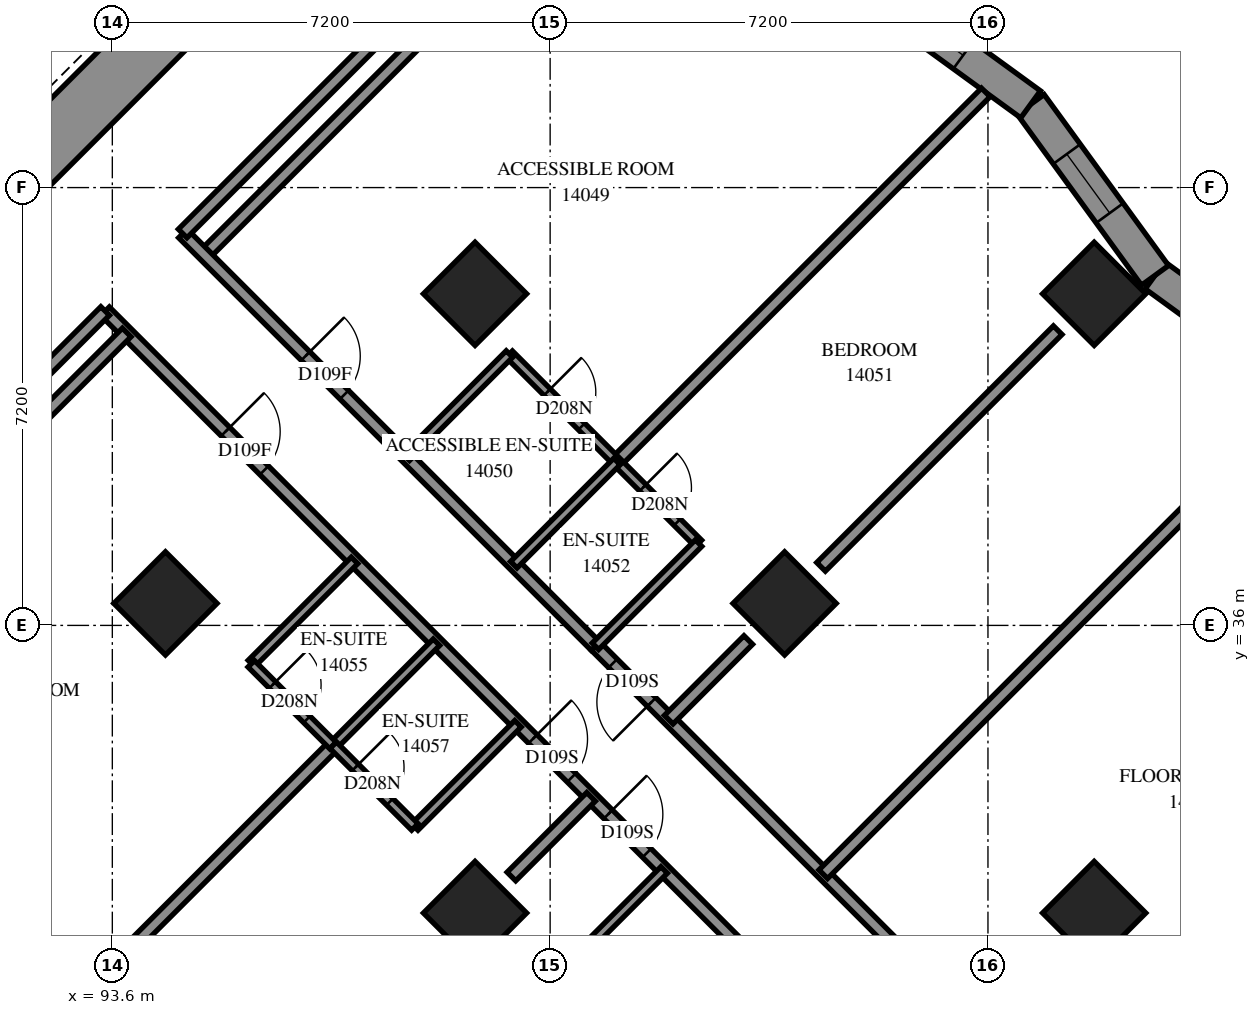
"""IFC4 building model, lengths in metres.
Left out: names, types, materials, properties, quantities, classifications, styles, units other than length and angle.
Written with IfcOpenShell. Run it as: python <this file> out.ifc"""

import sys

from ifc_helpers import new_model, si_unit, direction, frame, frame_2d, origin, origin_2d, place, context, subcontext, project, spatial, polyline, rectangle, outline, extrude, element, fill, save


model = new_model("IFC4")
c1 = context("Model", 3, precision=1e-05, world=origin(), true_north=direction((0.0, 1.0)))
c2 = subcontext(c1, "Body", "Model", "MODEL_VIEW")
j1 = project(units=[si_unit("LENGTHUNIT", "METRE"), si_unit("PLANEANGLEUNIT", "RADIAN")], contexts=[c1])
p1 = place(None, origin())
s1 = spatial("IfcSite", under=j1, at=p1, CompositionType="ELEMENT")
p2 = place(p1, origin())
s2 = spatial("IfcBuilding", under=s1, at=p2, CompositionType="ELEMENT")
p3 = place(p2, frame((0.0, 0.0, 54.2)))
s3 = spatial("IfcBuildingStorey", under=s2, at=p3, CompositionType="ELEMENT", Elevation=54.2)
for number, where, z_axis, x_axis in (
    (1, (99.565, 41.453, 0.0), (0.0, 0.0, 1.0), (0.707, -0.707, 0.0)),
    (2, (94.474, 36.362, 0.0), (0.0, 0.0, 1.0), (0.707, -0.707, 0.0)),
    (3, (109.747, 41.453, 0.0), (0.0, 0.0, 1.0), (0.707, -0.707, 0.0)),
    (4, (104.656, 36.362, 0.0), (0.0, 0.0, 1.0), (0.707, -0.707, 0.0)),
    (5, (99.565, 31.271, 0.0), (0.0, 0.0, 1.0), (0.707, -0.707, 0.0)),
    (6, (109.747, 31.271, 0.0), (0.0, 0.0, 1.0), (0.707, -0.707, 0.0)),
):
    element("IfcColumn", number, at=place(p3, frame(where, z_axis=z_axis, x_axis=x_axis)), inside=s3, PredefinedType="COLUMN", context=c2, shape_type="SweptSolid", body=[
        extrude(rectangle(XDim=1.2, YDim=1.2, at=origin_2d()), origin(), (0.0, 0.0, 1.0), 3.1),
    ])
p4 = place(p3, frame((87.19, 38.554, -0.3), z_axis=(0.0, 0.0, 1.0), x_axis=(0.707103309, 0.7071102534, 0.0)))
e7 = element("IfcWall", 7, at=p4, inside=s3, PredefinedType="SHEAR", context=c2, shape_type="SweptSolid", body=[
    extrude(rectangle(XDim=14.4, YDim=1.0, at=frame_2d((7.2, 0.0))), origin(), (0.0, 0.0, 1.0), 2.7),
])
p5 = place(p4, frame((4.55, 0.0, 0.3)))
e8 = element("IfcOpeningElement", 8, at=p5, cuts=e7, PredefinedType="OPENING", context=c2, shape_type="SweptSolid", body=[
    extrude(rectangle(XDim=1.1, YDim=2.1, at=frame_2d((0.55, 1.05))), frame((0.0, 0.51, 0.0), z_axis=(0.0, -1.0, 0.0), x_axis=(1.0, 0.0, 0.0)), (0.0, 0.0, 1.0), 1.02),
])
p6 = place(p4, frame((11.35, 0.0, 0.3)))
e9 = element("IfcOpeningElement", 9, at=p6, cuts=e7, PredefinedType="OPENING", context=c2, shape_type="SweptSolid", body=[
    extrude(rectangle(XDim=1.1, YDim=2.1, at=frame_2d((0.55, 1.05))), frame((0.0, 0.51, 0.0), z_axis=(0.0, -1.0, 0.0), x_axis=(1.0, 0.0, 0.0)), (0.0, 0.0, 1.0), 1.02),
])
p7 = place(p3, frame((113.56, 39.71, 0.0), z_axis=(0.0, 0.0, 1.0), x_axis=(-0.8086577494, 0.5882793931, 0.0)))
e10 = element("IfcWall", 10, at=p7, inside=s3, PredefinedType="SOLIDWALL", context=c2, shape_type="SweptSolid", body=[
    extrude(outline(polyline([(-0.043, -0.275), (3.435, -0.275), (3.522, 0.275), (0.043, 0.275), (-0.043, -0.275)])), origin(), (0.0, 0.0, 1.0), 3.1),
])
p8 = place(p7, frame((1.161, 0.0, 0.5)))
e11 = element("IfcOpeningElement", 11, at=p8, cuts=e10, PredefinedType="OPENING", context=c2, shape_type="SweptSolid", body=[
    extrude(rectangle(XDim=1.2, YDim=2.45, at=frame_2d((0.6, 1.225))), frame((0.0, 0.285, 0.0), z_axis=(0.0, -1.0, 0.0), x_axis=(1.0, 0.0, 0.0)), (0.0, 0.0, 1.0), 0.57),
])
p9 = place(p3, frame((110.747, 41.756, 0.0), z_axis=(0.0, 0.0, 1.0), x_axis=(-0.5882793931, 0.8086577494, 0.0)))
e12 = element("IfcWall", 12, at=p9, inside=s3, PredefinedType="SOLIDWALL", context=c2, shape_type="SweptSolid", body=[
    extrude(outline(polyline([(0.043, -0.275), (3.522, -0.275), (3.435, 0.275), (-0.043, 0.275), (0.043, -0.275)])), origin(), (0.0, 0.0, 1.0), 3.1),
])
p10 = place(p9, frame((1.267, 0.0, 0.5)))
e13 = element("IfcOpeningElement", 13, at=p10, cuts=e12, PredefinedType="OPENING", context=c2, shape_type="SweptSolid", body=[
    extrude(rectangle(XDim=1.2, YDim=2.45, at=frame_2d((0.6, 1.225))), frame((0.0, 0.285, 0.0), z_axis=(0.0, -1.0, 0.0), x_axis=(1.0, 0.0, 0.0)), (0.0, 0.0, 1.0), 0.57),
])
p11 = place(p3, frame((108.701, 44.569, 0.0), z_axis=(0.0, 0.0, 1.0), x_axis=(-0.8086577494, 0.5882793931, 0.0)))
e14 = element("IfcWall", 14, at=p11, inside=s3, PredefinedType="SOLIDWALL", context=c2, shape_type="SweptSolid", body=[
    extrude(outline(polyline([(-0.043, -0.275), (3.435, -0.275), (3.522, 0.275), (0.043, 0.275), (-0.043, -0.275)])), origin(), (0.0, 0.0, 1.0), 3.1),
])
p12 = place(p11, frame((1.372, 0.0, 0.5)))
e15 = element("IfcOpeningElement", 15, at=p12, cuts=e14, PredefinedType="OPENING", context=c2, shape_type="SweptSolid", body=[
    extrude(rectangle(XDim=1.2, YDim=2.45, at=frame_2d((0.6, 1.225))), frame((0.0, 0.285, 0.0), z_axis=(0.0, -1.0, 0.0), x_axis=(1.0, 0.0, 0.0)), (0.0, 0.0, 1.0), 0.57),
])
p13 = place(p3, frame((93.481, 41.167, 0.0), z_axis=(0.0, 0.0, 1.0), x_axis=(0.7071067812, -0.7071067812, 0.0)))
e16 = element("IfcWall", 16, at=p13, inside=s3, PredefinedType="PARTITIONING", context=c2, shape_type="SweptSolid", body=[
    extrude(rectangle(XDim=25.699, YDim=0.2, at=frame_2d((12.85, 0.0))), origin(), (0.0, 0.0, 1.0), 3.1),
])
p14 = place(p13, frame((2.8, 0.0, 0.0)))
e17 = element("IfcOpeningElement", 17, at=p14, cuts=e16, PredefinedType="OPENING", context=c2, shape_type="SweptSolid", body=[
    extrude(rectangle(XDim=0.9, YDim=2.1, at=frame_2d((0.45, 1.05))), frame((0.0, 0.11, 0.0), z_axis=(0.0, -1.0, 0.0), x_axis=(1.0, 0.0, 0.0)), (0.0, 0.0, 1.0), 0.22),
])
p15 = place(p13, frame((9.948, 0.0, 0.0)))
e18 = element("IfcOpeningElement", 18, at=p15, cuts=e16, PredefinedType="OPENING", context=c2, shape_type="SweptSolid", body=[
    extrude(rectangle(XDim=0.9, YDim=2.1, at=frame_2d((0.45, 1.05))), frame((0.0, 0.11, 0.0), z_axis=(0.0, -1.0, 0.0), x_axis=(1.0, 0.0, 0.0)), (0.0, 0.0, 1.0), 0.22),
])
p16 = place(p13, frame((11.7, 0.0, 0.0)))
e19 = element("IfcOpeningElement", 19, at=p16, cuts=e16, PredefinedType="OPENING", context=c2, shape_type="SweptSolid", body=[
    extrude(rectangle(XDim=0.9, YDim=2.1, at=frame_2d((0.45, 1.05))), frame((0.0, 0.11, 0.0), z_axis=(0.0, -1.0, 0.0), x_axis=(1.0, 0.0, 0.0)), (0.0, 0.0, 1.0), 0.22),
])
p17 = place(p13, frame((17.25, 0.0, 0.0)))
e20 = element("IfcOpeningElement", 20, at=p17, cuts=e16, PredefinedType="OPENING", context=c2, shape_type="SweptSolid", body=[
    extrude(rectangle(XDim=0.9, YDim=2.1, at=frame_2d((0.45, 1.05))), frame((0.0, 0.11, 0.0), z_axis=(0.0, -1.0, 0.0), x_axis=(1.0, 0.0, 0.0)), (0.0, 0.0, 1.0), 0.22),
])
p18 = place(p13, frame((22.82, 0.0, 0.0)))
e21 = element("IfcOpeningElement", 21, at=p18, cuts=e16, PredefinedType="OPENING", context=c2, shape_type="SweptSolid", body=[
    extrude(rectangle(XDim=0.9, YDim=2.1, at=frame_2d((0.45, 1.05))), frame((0.0, 0.11, 0.0), z_axis=(0.0, -1.0, 0.0), x_axis=(1.0, 0.0, 0.0)), (0.0, 0.0, 1.0), 0.22),
])
p19 = place(p3, frame((111.352, 25.855, 0.0), z_axis=(0.0, 0.0, 1.0), x_axis=(-0.7070418597, 0.7071716967, 0.0)))
e22 = element("IfcWall", 22, at=p19, inside=s3, PredefinedType="PARTITIONING", context=c2, shape_type="SweptSolid", body=[
    extrude(rectangle(XDim=13.864, YDim=0.2, at=frame_2d((6.932, 0.0))), origin(), (0.0, 0.0, 1.0), 3.1),
])
p20 = place(p19, frame((12.564, 0.0, 0.0)))
e23 = element("IfcOpeningElement", 23, at=p20, cuts=e22, PredefinedType="OPENING", context=c2, shape_type="SweptSolid", body=[
    extrude(rectangle(XDim=0.9, YDim=2.1, at=frame_2d((0.45, 1.05))), frame((0.0, 0.11, 0.0), z_axis=(0.0, -1.0, 0.0), x_axis=(1.0, 0.0, 0.0)), (0.0, 0.0, 1.0), 0.22),
])
p21 = place(p19, frame((5.19, 0.0, 0.0)))
e24 = element("IfcOpeningElement", 24, at=p21, cuts=e22, PredefinedType="OPENING", context=c2, shape_type="SweptSolid", body=[
    extrude(rectangle(XDim=1.0, YDim=2.1, at=frame_2d((0.5, 1.05))), frame((0.0, 0.11, 0.0), z_axis=(0.0, -1.0, 0.0), x_axis=(1.0, 0.0, 0.0)), (0.0, 0.0, 1.0), 0.22),
])
p22 = place(p3, frame((105.292, 31.908, 0.0), z_axis=(0.0, 0.0, 1.0), x_axis=(0.7071067812, 0.7071067812, 0.0)))
e25 = element("IfcWall", 25, at=p22, inside=s3, PredefinedType="PARTITIONING", context=c2, shape_type="SweptSolid", body=[
    extrude(rectangle(XDim=11.033, YDim=0.2, at=frame_2d((5.516, 0.0))), origin(), (0.0, 0.0, 1.0), 3.1),
])
p23 = place(p3, frame((95.109, 42.091, 0.0), z_axis=(0.0, 0.0, 1.0), x_axis=(0.7071113562, 0.7071022062, 0.0)))
e26 = element("IfcWall", 26, at=p23, inside=s3, PredefinedType="PARTITIONING", context=c2, shape_type="SweptSolid", body=[
    extrude(rectangle(XDim=10.929, YDim=0.2, at=frame_2d((5.465, 0.0))), origin(), (0.0, 0.0, 1.0), 3.1),
])
p24 = place(p3, frame((86.312, 33.293, 0.0), z_axis=(0.0, 0.0, 1.0), x_axis=(0.7071067812, 0.7071067812, 0.0)))
e27 = element("IfcWall", 27, at=p24, inside=s3, PredefinedType="PARTITIONING", context=c2, shape_type="SweptSolid", body=[
    extrude(rectangle(XDim=10.641, YDim=0.2, at=frame_2d((5.321, 0.0))), origin(), (0.0, 0.0, 1.0), 3.1),
])
p25 = place(p3, frame((94.761, 42.446, 0.0), z_axis=(0.0, 0.0, 1.0), x_axis=(0.7071067812, -0.7071067812, 0.0)))
e28 = element("IfcWall", 28, at=p25, inside=s3, PredefinedType="PARTITIONING", context=c2, shape_type="SweptSolid", body=[
    extrude(rectangle(XDim=9.597, YDim=0.2, at=frame_2d((4.798, 0.0))), origin(), (0.0, 0.0, 1.0), 3.1),
])
p26 = place(p25, frame((2.851, 0.0, 0.0)))
e29 = element("IfcOpeningElement", 29, at=p26, cuts=e28, PredefinedType="OPENING", context=c2, shape_type="SweptSolid", body=[
    extrude(rectangle(XDim=0.9, YDim=2.1, at=frame_2d((0.45, 1.05))), frame((0.0, 0.11, 0.0), z_axis=(0.0, -1.0, 0.0), x_axis=(1.0, 0.0, 0.0)), (0.0, 0.0, 1.0), 0.22),
])
for number, where, z_axis, x_axis in (
    (30, (86.836, 34.524, 0.0), (0.0, 0.0, 1.0), (0.707, 0.707, 0.0)),
    (31, (94.757, 42.445, 0.0), (0.0, 0.0, 1.0), (0.707, 0.707, 0.0)),
):
    element("IfcWall", number, at=place(p3, frame(where, z_axis=z_axis, x_axis=x_axis)), inside=s3, PredefinedType="PARTITIONING", context=c2, shape_type="SweptSolid", body=[
        extrude(rectangle(XDim=9.399, YDim=0.2, at=frame_2d((4.699, 0.0))), origin(), (0.0, 0.0, 1.0), 3.1),
    ])
p27 = place(p3, frame((101.896, 38.698, 0.0), z_axis=(0.0, 0.0, 1.0), x_axis=(0.7072233116, 0.7069902315, 0.0)))
e32 = element("IfcWall", 32, at=p27, inside=s3, PredefinedType="PARTITIONING", context=c2, shape_type="SweptSolid", body=[
    extrude(rectangle(XDim=8.581, YDim=0.2, at=frame_2d((4.29, 0.0))), origin(), (0.0, 0.0, 1.0), 3.1),
])
p28 = place(p3, frame((91.459, 28.251, 0.0), z_axis=(0.0, 0.0, 1.0), x_axis=(0.7072292218, 0.7069843194, 0.0)))
e33 = element("IfcWall", 33, at=p28, inside=s3, PredefinedType="PARTITIONING", context=c2, shape_type="SweptSolid", body=[
    extrude(rectangle(XDim=8.166, YDim=0.2, at=frame_2d((4.083, 0.0))), origin(), (0.0, 0.0, 1.0), 3.1),
])
p29 = place(p3, frame((105.255, 36.963, 0.0), z_axis=(0.0, 0.0, 1.0), x_axis=(0.7071067812, 0.7071067812, 0.0)))
e34 = element("IfcWall", 34, at=p29, inside=s3, PredefinedType="PARTITIONING", context=c2, shape_type="SweptSolid", body=[
    extrude(rectangle(XDim=5.504, YDim=0.2, at=frame_2d((2.752, 0.0))), origin(), (0.0, 0.0, 1.0), 3.1),
])
p30 = place(p3, frame((100.126, 40.461, 0.0), z_axis=(0.0, 0.0, 1.0), x_axis=(0.7071067812, -0.7071067812, 0.0)))
e35 = element("IfcWall", 35, at=p30, inside=s3, PredefinedType="PARTITIONING", context=c2, shape_type="SweptSolid", body=[
    extrude(rectangle(XDim=4.401, YDim=0.15, at=frame_2d((2.2, 0.0))), origin(), (0.0, 0.0, 1.0), 3.1),
])
p31 = place(p30, frame((0.883, 0.0, 0.0)))
e36 = element("IfcOpeningElement", 36, at=p31, cuts=e35, PredefinedType="OPENING", context=c2, shape_type="SweptSolid", body=[
    extrude(rectangle(XDim=0.8, YDim=2.1, at=frame_2d((0.4, 1.05))), frame((0.0, 0.085, 0.0), z_axis=(0.0, -1.0, 0.0), x_axis=(1.0, 0.0, 0.0)), (0.0, 0.0, 1.0), 0.17),
])
p32 = place(p30, frame((3.108, 0.0, 0.0)))
e37 = element("IfcOpeningElement", 37, at=p32, cuts=e35, PredefinedType="OPENING", context=c2, shape_type="SweptSolid", body=[
    extrude(rectangle(XDim=0.8, YDim=2.1, at=frame_2d((0.4, 1.05))), frame((0.0, 0.085, 0.0), z_axis=(0.0, -1.0, 0.0), x_axis=(1.0, 0.0, 0.0)), (0.0, 0.0, 1.0), 0.17),
])
for number, where, z_axis, x_axis in (
    (38, (100.977, 30.281, 0.0), (0.0, 0.0, 1.0), (0.707, 0.707, 0.0)),
    (39, (98.573, 32.685, 0.0), (0.0, 0.0, 1.0), (0.707, 0.707, 0.0)),
):
    element("IfcWall", number, at=place(p3, frame(where, z_axis=z_axis, x_axis=x_axis)), inside=s3, PredefinedType="PARTITIONING", context=c2, shape_type="SweptSolid", body=[
        extrude(rectangle(XDim=2.401, YDim=0.15, at=frame_2d((1.201, 0.0))), origin(), (0.0, 0.0, 1.0), 3.1),
    ])
for number, where, z_axis, x_axis in (
    (40, (97.234, 34.026, 0.0), (0.0, 0.0, 1.0), (0.707, 0.708, 0.0)),
    (41, (98.435, 38.765, 0.0), (0.0, 0.0, 1.0), (0.707, 0.708, 0.0)),
    (42, (100.203, 36.997, 0.0), (0.0, 0.0, 1.0), (0.707, 0.708, 0.0)),
):
    element("IfcWall", number, at=place(p3, frame(where, z_axis=z_axis, x_axis=x_axis)), inside=s3, PredefinedType="PARTITIONING", context=c2, shape_type="SweptSolid", body=[
        extrude(rectangle(XDim=2.4, YDim=0.15, at=frame_2d((1.2, 0.0))), origin(), (0.0, 0.0, 1.0), 3.1),
    ])
for number, where, z_axis, x_axis in (
    (43, (95.887, 35.373, 0.0), (0.0, 0.0, 1.0), (0.707, 0.707, 0.0)),
    (44, (101.545, 35.657, 0.0), (0.0, 0.0, 1.0), (0.707, 0.707, 0.0)),
):
    element("IfcWall", number, at=place(p3, frame(where, z_axis=z_axis, x_axis=x_axis)), inside=s3, PredefinedType="PARTITIONING", context=c2, shape_type="SweptSolid", body=[
        extrude(rectangle(XDim=2.398, YDim=0.15, at=frame_2d((1.199, 0.0))), origin(), (0.0, 0.0, 1.0), 3.1),
    ])
p33 = place(p3, frame((95.885, 35.369, 0.0), z_axis=(0.0, 0.0, 1.0), x_axis=(0.7071067812, -0.7071067812, 0.0)))
e45 = element("IfcWall", 45, at=p33, inside=s3, PredefinedType="PARTITIONING", context=c2, shape_type="SweptSolid", body=[
    extrude(rectangle(XDim=1.901, YDim=0.15, at=frame_2d((0.95, 0.0))), origin(), (0.0, 0.0, 1.0), 3.1),
])
p34 = place(p33, frame((0.493, 0.0, 0.0)))
e46 = element("IfcOpeningElement", 46, at=p34, cuts=e45, PredefinedType="OPENING", context=c2, shape_type="SweptSolid", body=[
    extrude(rectangle(XDim=0.8, YDim=2.1, at=frame_2d((0.4, 1.05))), frame((0.0, 0.085, 0.0), z_axis=(0.0, -1.0, 0.0), x_axis=(1.0, 0.0, 0.0)), (0.0, 0.0, 1.0), 0.17),
])
p35 = place(p3, frame((97.233, 34.029, 0.0), z_axis=(0.0, 0.0, 1.0), x_axis=(0.7065800724, -0.7076330979, 0.0)))
e47 = element("IfcWall", 47, at=p35, inside=s3, PredefinedType="PARTITIONING", context=c2, shape_type="SweptSolid", body=[
    extrude(rectangle(XDim=1.899, YDim=0.15, at=frame_2d((0.95, 0.0))), origin(), (0.0, 0.0, 1.0), 3.1),
])
p36 = place(p35, frame((0.515, 0.0, 0.0)))
e48 = element("IfcOpeningElement", 48, at=p36, cuts=e47, PredefinedType="OPENING", context=c2, shape_type="SweptSolid", body=[
    extrude(rectangle(XDim=0.8, YDim=2.1, at=frame_2d((0.4, 1.05))), frame((0.0, 0.085, 0.0), z_axis=(0.0, -1.0, 0.0), x_axis=(1.0, 0.0, 0.0)), (0.0, 0.0, 1.0), 0.17),
])
p37 = place(p3, frame((100.163, 31.871, 0.0), z_axis=(0.0, 0.0, 1.0), x_axis=(0.7071067812, 0.7071067812, 0.0)))
e49 = element("IfcWall", 49, at=p37, inside=s3, PredefinedType="PARTITIONING", context=c2, shape_type="SweptSolid", body=[
    extrude(rectangle(XDim=1.853, YDim=0.2, at=frame_2d((0.926, 0.0))), origin(), (0.0, 0.0, 1.0), 3.1),
])
p38 = place(p3, frame((102.75, 34.45, 0.0), z_axis=(0.0, 0.0, 1.0), x_axis=(0.7065663865, 0.7076467632, 0.0)))
e50 = element("IfcWall", 50, at=p38, inside=s3, PredefinedType="PARTITIONING", context=c2, shape_type="SweptSolid", body=[
    extrude(rectangle(XDim=1.851, YDim=0.2, at=frame_2d((0.926, 0.0))), origin(), (0.0, 0.0, 1.0), 3.1),
])
p39 = place(p10, origin())
e51 = element("IfcWindow", 51, at=p39, inside=s3, PartitioningType="SINGLE_PANEL", PredefinedType="WINDOW", context=c2, shape_type="SweptSolid", body=[
    extrude(rectangle(XDim=1.2, YDim=2.45, at=frame_2d((0.6, 1.225))), frame((0.0, 0.155, 0.0), z_axis=(0.0, -1.0, 0.0), x_axis=(1.0, 0.0, 0.0)), (0.0, 0.0, 1.0), 0.06),
])
fill(e13, e51)
p40 = place(p12, origin())
e52 = element("IfcWindow", 52, at=p40, inside=s3, PartitioningType="SINGLE_PANEL", PredefinedType="WINDOW", context=c2, shape_type="SweptSolid", body=[
    extrude(rectangle(XDim=1.2, YDim=2.45, at=frame_2d((0.6, 1.225))), frame((0.0, 0.155, 0.0), z_axis=(0.0, -1.0, 0.0), x_axis=(1.0, 0.0, 0.0)), (0.0, 0.0, 1.0), 0.06),
])
fill(e15, e52)
p41 = place(p26, origin())
e53 = element("IfcDoor", 53, at=p41, inside=s3, OperationType="SINGLE_SWING_RIGHT", PredefinedType="DOOR", context=c2, shape_type="SweptSolid", body=[
    extrude(rectangle(XDim=0.9, YDim=2.1, at=frame_2d((0.45, 1.05))), frame((0.0, 0.025, 0.0), z_axis=(0.0, -1.0, 0.0), x_axis=(1.0, 0.0, 0.0)), (0.0, 0.0, 1.0), 0.05),
])
fill(e29, e53)
p42 = place(p31, origin())
e54 = element("IfcDoor", 54, at=p42, inside=s3, OperationType="SINGLE_SWING_RIGHT", PredefinedType="DOOR", context=c2, shape_type="SweptSolid", body=[
    extrude(rectangle(XDim=0.8, YDim=2.1, at=frame_2d((0.4, 1.05))), frame((0.0, 0.025, 0.0), z_axis=(0.0, -1.0, 0.0), x_axis=(1.0, 0.0, 0.0)), (0.0, 0.0, 1.0), 0.05),
])
fill(e36, e54)
p43 = place(p20, origin())
e55 = element("IfcDoor", 55, at=p43, inside=s3, OperationType="SINGLE_SWING_RIGHT", PredefinedType="DOOR", context=c2, shape_type="SweptSolid", body=[
    extrude(rectangle(XDim=0.9, YDim=2.1, at=frame_2d((0.45, 1.05))), frame((0.0, 0.025, 0.0), z_axis=(0.0, -1.0, 0.0), x_axis=(1.0, 0.0, 0.0)), (0.0, 0.0, 1.0), 0.05),
])
fill(e23, e55)
p44 = place(p32, origin())
e56 = element("IfcDoor", 56, at=p44, inside=s3, OperationType="SINGLE_SWING_RIGHT", PredefinedType="DOOR", context=c2, shape_type="SweptSolid", body=[
    extrude(rectangle(XDim=0.8, YDim=2.1, at=frame_2d((0.4, 1.05))), frame((0.0, 0.025, 0.0), z_axis=(0.0, -1.0, 0.0), x_axis=(1.0, 0.0, 0.0)), (0.0, 0.0, 1.0), 0.05),
])
fill(e37, e56)
p45 = place(p14, origin())
e57 = element("IfcDoor", 57, at=p45, inside=s3, OperationType="SINGLE_SWING_LEFT", PredefinedType="DOOR", context=c2, shape_type="SweptSolid", body=[
    extrude(rectangle(XDim=0.9, YDim=2.1, at=frame_2d((0.45, 1.05))), frame((0.0, 0.025, 0.0), z_axis=(0.0, -1.0, 0.0), x_axis=(1.0, 0.0, 0.0)), (0.0, 0.0, 1.0), 0.05),
])
fill(e17, e57)
p46 = place(p34, origin())
e58 = element("IfcDoor", 58, at=p46, inside=s3, OperationType="SINGLE_SWING_RIGHT", PredefinedType="DOOR", context=c2, shape_type="SweptSolid", body=[
    extrude(rectangle(XDim=0.8, YDim=2.1, at=frame_2d((0.4, 1.05))), frame((0.0, 0.025, 0.0), z_axis=(0.0, -1.0, 0.0), x_axis=(1.0, 0.0, 0.0)), (0.0, 0.0, 1.0), 0.05),
])
fill(e46, e58)
p47 = place(p15, origin())
e59 = element("IfcDoor", 59, at=p47, inside=s3, OperationType="SINGLE_SWING_LEFT", PredefinedType="DOOR", context=c2, shape_type="SweptSolid", body=[
    extrude(rectangle(XDim=0.9, YDim=2.1, at=frame_2d((0.45, 1.05))), frame((0.0, 0.025, 0.0), z_axis=(0.0, -1.0, 0.0), x_axis=(1.0, 0.0, 0.0)), (0.0, 0.0, 1.0), 0.05),
])
fill(e18, e59)
p48 = place(p36, origin())
e60 = element("IfcDoor", 60, at=p48, inside=s3, OperationType="SINGLE_SWING_RIGHT", PredefinedType="DOOR", context=c2, shape_type="SweptSolid", body=[
    extrude(rectangle(XDim=0.8, YDim=2.1, at=frame_2d((0.4, 1.05))), frame((0.0, 0.025, 0.0), z_axis=(0.0, -1.0, 0.0), x_axis=(1.0, 0.0, 0.0)), (0.0, 0.0, 1.0), 0.05),
])
fill(e48, e60)
p49 = place(p16, origin())
e61 = element("IfcDoor", 61, at=p49, inside=s3, OperationType="SINGLE_SWING_RIGHT", PredefinedType="DOOR", context=c2, shape_type="SweptSolid", body=[
    extrude(rectangle(XDim=0.9, YDim=2.1, at=frame_2d((0.45, 1.05))), frame((0.0, 0.025, 0.0), z_axis=(0.0, -1.0, 0.0), x_axis=(1.0, 0.0, 0.0)), (0.0, 0.0, 1.0), 0.05),
])
fill(e19, e61)
save(model, sys.argv[1])
